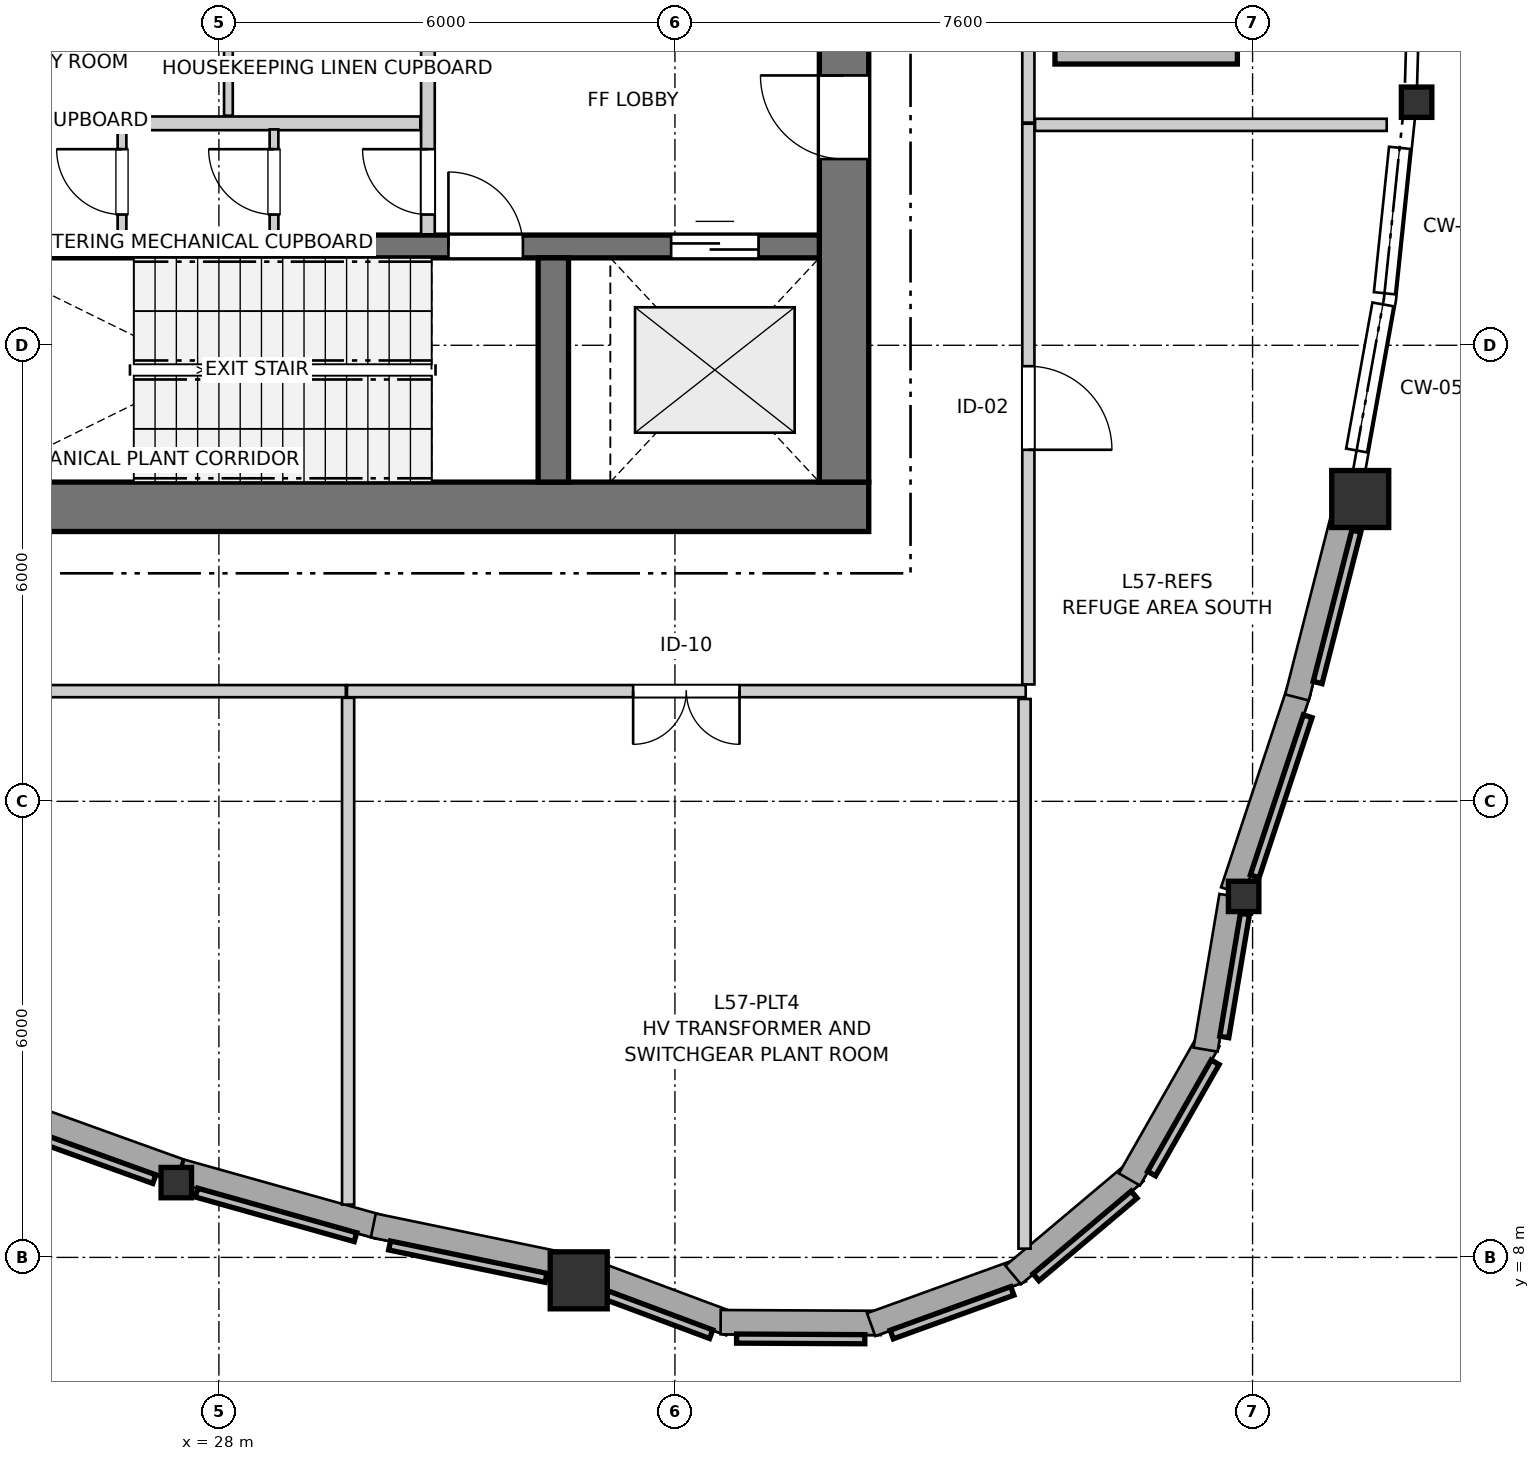
"""IFC4 building model, lengths in metres.
Left out: names, types, materials, properties, quantities, classifications, styles, units other than length and angle.
Written with IfcOpenShell. Run it as: python <this file> out.ifc"""

import sys

from ifc_helpers import new_model, si_unit, direction, frame, frame_2d, origin, origin_2d, place, context, subcontext, project, spatial, rectangle, i_section, extrude, source, transform, mapped, element, fill, save


model = new_model("IFC4")
c1 = context("Model", 3, precision=1e-05, world=origin(), true_north=direction((0.0, 1.0)))
c2 = subcontext(c1, "Body", "Model", "MODEL_VIEW")
j1 = project(units=[si_unit("LENGTHUNIT", "METRE"), si_unit("PLANEANGLEUNIT", "RADIAN")], contexts=[c1])
p1 = place(None, origin())
s1 = spatial("IfcSite", under=j1, at=p1, CompositionType="ELEMENT")
p2 = place(p1, origin())
s2 = spatial("IfcBuilding", under=s1, at=p2, CompositionType="ELEMENT")
p3 = place(p2, frame((0.0, 0.0, 190.6)))
s3 = spatial("IfcBuildingStorey", under=s2, at=p3, CompositionType="ELEMENT", Elevation=190.6)
p4 = place(p3, frame((24.15, 17.875, 0.0), z_axis=(0.0, 0.0, 1.0), x_axis=(1.0, 0.0, 0.0)))
e1 = element("IfcWall", 1, at=p4, inside=s3, PredefinedType="SHEAR", context=c2, shape_type="SweptSolid", body=[
    extrude(rectangle(XDim=12.4, YDim=0.65, at=frame_2d((6.2, 0.0))), origin(), (0.0, 0.0, 1.0), 4.76),
])
p5 = place(p3, frame((36.225, 18.2, 0.0), z_axis=(0.0, 0.0, 1.0), x_axis=(0.0, 1.0, 0.0)))
e2 = element("IfcWall", 2, at=p5, inside=s3, PredefinedType="SHEAR", context=c2, shape_type="SweptSolid", body=[
    extrude(rectangle(XDim=15.6, YDim=0.65, at=frame_2d((7.8, 0.0))), origin(), (0.0, 0.0, 1.0), 4.76),
])
p6 = place(p5, frame((4.25, 0.0, 0.0)))
e3 = element("IfcOpeningElement", 3, at=p6, cuts=e2, PredefinedType="OPENING", context=c2, shape_type="SweptSolid", body=[
    extrude(rectangle(XDim=1.1, YDim=2.15, at=frame_2d((0.55, 1.075))), frame((0.0, 0.335, 0.0), z_axis=(0.0, -1.0, 0.0), x_axis=(1.0, 0.0, 0.0)), (0.0, 0.0, 1.0), 0.67),
])
p7 = place(p5, frame((10.25, 0.0, 0.0)))
e4 = element("IfcOpeningElement", 4, at=p7, cuts=e2, PredefinedType="OPENING", context=c2, shape_type="SweptSolid", body=[
    extrude(rectangle(XDim=1.1, YDim=2.15, at=frame_2d((0.55, 1.075))), frame((0.0, 0.335, 0.0), z_axis=(0.0, -1.0, 0.0), x_axis=(1.0, 0.0, 0.0)), (0.0, 0.0, 1.0), 0.67),
])
p8 = place(p3, frame((24.8, 21.3, 0.0), z_axis=(0.0, 0.0, 1.0), x_axis=(1.0, 0.0, 0.0)))
e5 = element("IfcWall", 5, at=p8, inside=s3, PredefinedType="SHEAR", context=c2, shape_type="SweptSolid", body=[
    extrude(rectangle(XDim=11.1, YDim=0.3, at=frame_2d((5.55, 0.0))), origin(), (0.0, 0.0, 1.0), 4.76),
])
p9 = place(p8, frame((6.22, 0.0, 0.0)))
e6 = element("IfcOpeningElement", 6, at=p9, cuts=e5, PredefinedType="OPENING", context=c2, shape_type="SweptSolid", body=[
    extrude(rectangle(XDim=0.98, YDim=2.15, at=frame_2d((0.49, 1.075))), frame((0.0, 0.16, 0.0), z_axis=(0.0, -1.0, 0.0), x_axis=(1.0, 0.0, 0.0)), (0.0, 0.0, 1.0), 0.32),
])
p10 = place(p8, frame((9.15, 0.0, 0.0)))
e7 = element("IfcOpeningElement", 7, at=p10, cuts=e5, PredefinedType="OPENING", context=c2, shape_type="SweptSolid", body=[
    extrude(rectangle(XDim=1.15, YDim=2.15, at=frame_2d((0.575, 1.075))), frame((0.0, 0.16, 0.0), z_axis=(0.0, -1.0, 0.0), x_axis=(1.0, 0.0, 0.0)), (0.0, 0.0, 1.0), 0.32),
])
p11 = place(p3, frame((32.4, 18.2, 0.0), z_axis=(0.0, 0.0, 1.0), x_axis=(0.0, 1.0, 0.0)))
e8 = element("IfcWall", 8, at=p11, inside=s3, PredefinedType="SHEAR", context=c2, shape_type="SweptSolid", body=[
    extrude(rectangle(XDim=2.95, YDim=0.4, at=frame_2d((1.475, 0.0))), origin(), (0.0, 0.0, 1.0), 4.76),
])
m1 = source(origin(), c2, "Body", "SweptSolid", [
    extrude(i_section(OverallWidth=0.401, OverallDepth=0.399, WebThickness=0.023, FlangeThickness=0.036, FilletRadius=0.015, at=origin_2d()), origin(), (0.0, 0.0, 1.0), 4.76),
])
p12 = place(p3, frame((27.439, 8.984, 0.0), z_axis=(0.0, 0.0, 1.0), x_axis=(1.0, 0.0, 0.0)))
e9 = element("IfcColumn", 9, at=p12, inside=s3, PredefinedType="PILASTER", context=c2, shape_type="MappedRepresentation", body=[
    mapped(m1, transform((0.0, 0.0, 0.0), x_axis=(1.0, 0.0, 0.0), y_axis=(0.0, 1.0, 0.0), z_axis=(0.0, 0.0, 1.0), scale=1.0)),
])
m2 = source(origin(), c2, "Body", "SweptSolid", [
    extrude(rectangle(XDim=0.75, YDim=0.75, at=origin_2d()), origin(), (0.0, 0.0, 1.0), 4.76),
])
p13 = place(p3, frame((32.734, 7.698, 0.0), z_axis=(0.0, 0.0, 1.0), x_axis=(1.0, 0.0, 0.0)))
e10 = element("IfcColumn", 10, at=p13, inside=s3, PredefinedType="COLUMN", context=c2, shape_type="MappedRepresentation", body=[
    mapped(m2, transform((0.0, 0.0, 0.0), x_axis=(1.0, 0.0, 0.0), y_axis=(0.0, 1.0, 0.0), z_axis=(0.0, 0.0, 1.0), scale=1.0)),
])
p14 = place(p3, frame((41.483, 12.749, 0.0), z_axis=(0.0, 0.0, 1.0), x_axis=(1.0, 0.0, 0.0)))
e11 = element("IfcColumn", 11, at=p14, inside=s3, PredefinedType="PILASTER", context=c2, shape_type="MappedRepresentation", body=[
    mapped(m1, transform((0.0, 0.0, 0.0), x_axis=(1.0, 0.0, 0.0), y_axis=(0.0, 1.0, 0.0), z_axis=(0.0, 0.0, 1.0), scale=1.0)),
])
p15 = place(p3, frame((43.017, 17.977, 0.0), z_axis=(0.0, 0.0, 1.0), x_axis=(1.0, 0.0, 0.0)))
e12 = element("IfcColumn", 12, at=p15, inside=s3, PredefinedType="COLUMN", context=c2, shape_type="MappedRepresentation", body=[
    mapped(m2, transform((0.0, 0.0, 0.0), x_axis=(1.0, 0.0, 0.0), y_axis=(0.0, 1.0, 0.0), z_axis=(0.0, 0.0, 1.0), scale=1.0)),
])
p16 = place(p3, frame((43.758, 23.198, 0.0), z_axis=(0.0, 0.0, 1.0), x_axis=(1.0, 0.0, 0.0)))
e13 = element("IfcColumn", 13, at=p16, inside=s3, PredefinedType="PILASTER", context=c2, shape_type="MappedRepresentation", body=[
    mapped(m1, transform((0.0, 0.0, 0.0), x_axis=(1.0, 0.0, 0.0), y_axis=(0.0, 1.0, 0.0), z_axis=(0.0, 0.0, 1.0), scale=1.0)),
])
p17 = place(p3, frame((24.962, 10.046, 0.0), z_axis=(0.0, 0.0, 1.0), x_axis=(0.940882751101, -0.33873241457, 0.0)))
e14 = element("IfcWall", 14, at=p17, inside=s3, PredefinedType="SOLIDWALL", context=c2, shape_type="SweptSolid", body=[
    extrude(rectangle(XDim=2.671, YDim=0.32, at=frame_2d((1.335, 0.0))), origin(), (0.0, 0.0, 1.0), 4.34),
])
p18 = place(p3, frame((27.502, 9.133, 0.0), z_axis=(0.0, 0.0, 1.0), x_axis=(0.962852806557, -0.270026800345, 0.0)))
e15 = element("IfcWall", 15, at=p18, inside=s3, PredefinedType="SOLIDWALL", context=c2, shape_type="SweptSolid", body=[
    extrude(rectangle(XDim=2.715, YDim=0.32, at=frame_2d((1.357, 0.0))), origin(), (0.0, 0.0, 1.0), 4.34),
])
p19 = place(p3, frame((30.032, 8.42, 0.0), z_axis=(0.0, 0.0, 1.0), x_axis=(0.979291555144, -0.202455056799, 0.0)))
e16 = element("IfcWall", 16, at=p19, inside=s3, PredefinedType="SOLIDWALL", context=c2, shape_type="SweptSolid", body=[
    extrude(rectangle(XDim=2.628, YDim=0.32, at=frame_2d((1.314, 0.0))), origin(), (0.0, 0.0, 1.0), 4.34),
])
p20 = place(p3, frame((32.945, 7.791, 0.0), z_axis=(0.0, 0.0, 1.0), x_axis=(0.93690697627, -0.349578771977, 0.0)))
e17 = element("IfcWall", 17, at=p20, inside=s3, PredefinedType="SOLIDWALL", context=c2, shape_type="SweptSolid", body=[
    extrude(rectangle(XDim=1.906, YDim=0.32, at=frame_2d((0.953, 0.0))), origin(), (0.0, 0.0, 1.0), 4.34),
])
for number, where, z_axis, x_axis in (
    (18, (34.602, 7.148, 0.0), (0.0, 0.0, 1.0), (1.0, -0.005, 0.0)),
    (19, (36.581, 7.115, 0.0), (0.0, 0.0, 1.0), (0.94, 0.341, 0.0)),
):
    element("IfcWall", number, at=place(p3, frame(where, z_axis=z_axis, x_axis=x_axis)), inside=s3, PredefinedType="SOLIDWALL", context=c2, shape_type="SweptSolid", body=[
        extrude(rectangle(XDim=2.109, YDim=0.32, at=frame_2d((1.054, 0.0))), origin(), (0.0, 0.0, 1.0), 4.34),
    ])
p21 = place(p3, frame((38.451, 7.768, 0.0), z_axis=(0.0, 0.0, 1.0), x_axis=(0.764947219724, 0.644092967697, 0.0)))
e20 = element("IfcWall", 20, at=p21, inside=s3, PredefinedType="SOLIDWALL", context=c2, shape_type="SweptSolid", body=[
    extrude(rectangle(XDim=2.109, YDim=0.32, at=frame_2d((1.055, 0.0))), origin(), (0.0, 0.0, 1.0), 4.34),
])
p22 = place(p3, frame((39.98, 9.025, 0.0), z_axis=(0.0, 0.0, 1.0), x_axis=(0.495714993308, 0.868485259178, 0.0)))
e21 = element("IfcWall", 21, at=p22, inside=s3, PredefinedType="SOLIDWALL", context=c2, shape_type="SweptSolid", body=[
    extrude(rectangle(XDim=2.109, YDim=0.32, at=frame_2d((1.054, 0.0))), origin(), (0.0, 0.0, 1.0), 4.34),
])
p23 = place(p3, frame((40.982, 10.734, 0.0), z_axis=(0.0, 0.0, 1.0), x_axis=(0.165711561454, 0.986174263708, 0.0)))
e22 = element("IfcWall", 22, at=p23, inside=s3, PredefinedType="SOLIDWALL", context=c2, shape_type="SweptSolid", body=[
    extrude(rectangle(XDim=2.051, YDim=0.32, at=frame_2d((1.025, 0.0))), origin(), (0.0, 0.0, 1.0), 4.34),
])
p24 = place(p3, frame((41.337, 12.819, 0.0), z_axis=(0.0, 0.0, 1.0), x_axis=(0.31443095402, 0.949280345922, 0.0)))
e23 = element("IfcWall", 23, at=p24, inside=s3, PredefinedType="SOLIDWALL", context=c2, shape_type="SweptSolid", body=[
    extrude(rectangle(XDim=2.773, YDim=0.32, at=frame_2d((1.386, 0.0))), origin(), (0.0, 0.0, 1.0), 4.34),
])
p25 = place(p3, frame((42.184, 15.367, 0.0), z_axis=(0.0, 0.0, 1.0), x_axis=(0.247650778908, 0.968849364817, 0.0)))
e24 = element("IfcWall", 24, at=p25, inside=s3, PredefinedType="SOLIDWALL", context=c2, shape_type="SweptSolid", body=[
    extrude(rectangle(XDim=2.57, YDim=0.32, at=frame_2d((1.285, 0.0))), origin(), (0.0, 0.0, 1.0), 4.34),
])
p26 = place(p3, frame((30.75, 21.46, 0.0), z_axis=(0.0, 0.0, 1.0), x_axis=(0.0, 1.0, 0.0)))
e25 = element("IfcWall", 25, at=p26, inside=s3, PredefinedType="PARTITIONING", context=c2, shape_type="SweptSolid", body=[
    extrude(rectangle(XDim=3.11, YDim=0.18, at=frame_2d((1.555, 0.0))), origin(), (0.0, 0.0, 1.0), 4.76),
])
p27 = place(p26, frame((0.26, 0.0, 0.0)))
e26 = element("IfcOpeningElement", 26, at=p27, cuts=e25, PredefinedType="OPENING", context=c2, shape_type="SweptSolid", body=[
    extrude(rectangle(XDim=0.86, YDim=2.05, at=frame_2d((0.43, 1.025))), frame((0.0, 0.1, 0.0), z_axis=(0.0, -1.0, 0.0), x_axis=(1.0, 0.0, 0.0)), (0.0, 0.0, 1.0), 0.2),
])
p28 = place(p3, frame((24.81, 22.92, 0.0), z_axis=(0.0, 0.0, 1.0), x_axis=(1.0, 0.0, 0.0)))
e27 = element("IfcWall", 27, at=p28, inside=s3, PredefinedType="PARTITIONING", context=c2, shape_type="SweptSolid", body=[
    extrude(rectangle(XDim=5.84, YDim=0.18, at=frame_2d((2.92, 0.0))), origin(), (0.0, 0.0, 1.0), 4.76),
])
p29 = place(p3, frame((28.125, 23.02, 0.0), z_axis=(0.0, 0.0, 1.0), x_axis=(0.0, 1.0, 0.0)))
e28 = element("IfcWall", 28, at=p29, inside=s3, PredefinedType="PARTITIONING", context=c2, shape_type="SweptSolid", body=[
    extrude(rectangle(XDim=1.77, YDim=0.115, at=frame_2d((0.885, 0.0))), origin(), (0.0, 0.0, 1.0), 4.76),
])
p30 = place(p3, frame((26.725, 21.46, 0.0), z_axis=(0.0, 0.0, 1.0), x_axis=(0.0, 1.0, 0.0)))
e29 = element("IfcWall", 29, at=p30, inside=s3, PredefinedType="PARTITIONING", context=c2, shape_type="SweptSolid", body=[
    extrude(rectangle(XDim=1.38, YDim=0.115, at=frame_2d((0.69, 0.0))), origin(), (0.0, 0.0, 1.0), 4.76),
])
p31 = place(p30, frame((0.26, 0.0, 0.0)))
e30 = element("IfcOpeningElement", 30, at=p31, cuts=e29, PredefinedType="OPENING", context=c2, shape_type="SweptSolid", body=[
    extrude(rectangle(XDim=0.86, YDim=2.05, at=frame_2d((0.43, 1.025))), frame((0.0, 0.067, 0.0), z_axis=(0.0, -1.0, 0.0), x_axis=(1.0, 0.0, 0.0)), (0.0, 0.0, 1.0), 0.135),
])
p32 = place(p3, frame((28.725, 21.46, 0.0), z_axis=(0.0, 0.0, 1.0), x_axis=(0.0, 1.0, 0.0)))
e31 = element("IfcWall", 31, at=p32, inside=s3, PredefinedType="PARTITIONING", context=c2, shape_type="SweptSolid", body=[
    extrude(rectangle(XDim=1.38, YDim=0.115, at=frame_2d((0.69, 0.0))), origin(), (0.0, 0.0, 1.0), 4.76),
])
p33 = place(p32, frame((0.26, 0.0, 0.0)))
e32 = element("IfcOpeningElement", 32, at=p33, cuts=e31, PredefinedType="OPENING", context=c2, shape_type="SweptSolid", body=[
    extrude(rectangle(XDim=0.86, YDim=2.05, at=frame_2d((0.43, 1.025))), frame((0.0, 0.067, 0.0), z_axis=(0.0, -1.0, 0.0), x_axis=(1.0, 0.0, 0.0)), (0.0, 0.0, 1.0), 0.135),
])
p34 = place(p3, frame((38.615, 15.45, 0.0), z_axis=(0.0, 0.0, 1.0), x_axis=(-1.0, 0.0, 0.0)))
e33 = element("IfcWall", 33, at=p34, inside=s3, PredefinedType="PARTITIONING", context=c2, shape_type="SweptSolid", body=[
    extrude(rectangle(XDim=8.93, YDim=0.16, at=frame_2d((4.465, 0.0))), origin(), (0.0, 0.0, 1.0), 4.76),
])
p35 = place(p34, frame((3.765, 0.0, 0.0)))
e34 = element("IfcOpeningElement", 34, at=p35, cuts=e33, PredefinedType="OPENING", context=c2, shape_type="SweptSolid", body=[
    extrude(rectangle(XDim=1.4, YDim=2.15, at=frame_2d((0.7, 1.075))), frame((0.0, 0.09, 0.0), z_axis=(0.0, -1.0, 0.0), x_axis=(1.0, 0.0, 0.0)), (0.0, 0.0, 1.0), 0.18),
])
p36 = place(p3, frame((38.65, 22.915, 0.0), z_axis=(0.0, 0.0, 1.0), x_axis=(0.0, -1.0, 0.0)))
e35 = element("IfcWall", 35, at=p36, inside=s3, PredefinedType="PARTITIONING", context=c2, shape_type="SweptSolid", body=[
    extrude(rectangle(XDim=7.377, YDim=0.16, at=frame_2d((3.688, 0.0))), origin(), (0.0, 0.0, 1.0), 4.228),
])
p37 = place(p36, frame((3.19, 0.0, 0.0)))
e36 = element("IfcOpeningElement", 36, at=p37, cuts=e35, PredefinedType="OPENING", context=c2, shape_type="SweptSolid", body=[
    extrude(rectangle(XDim=1.1, YDim=2.15, at=frame_2d((0.55, 1.075))), frame((0.0, 0.09, 0.0), z_axis=(0.0, -1.0, 0.0), x_axis=(1.0, 0.0, 0.0)), (0.0, 0.0, 1.0), 0.18),
])
p38 = place(p3, frame((38.65, 29.07, 0.0), z_axis=(0.0, 0.0, 1.0), x_axis=(0.0, -1.0, 0.0)))
e37 = element("IfcWall", 37, at=p38, inside=s3, PredefinedType="PARTITIONING", context=c2, shape_type="SweptSolid", body=[
    extrude(rectangle(XDim=6.14, YDim=0.16, at=frame_2d((3.07, 0.0))), origin(), (0.0, 0.0, 1.0), 4.228),
])
p39 = place(p38, frame((2.37, 0.0, 0.0)))
e38 = element("IfcOpeningElement", 38, at=p39, cuts=e37, PredefinedType="OPENING", context=c2, shape_type="SweptSolid", body=[
    extrude(rectangle(XDim=1.4, YDim=2.15, at=frame_2d((0.7, 1.075))), frame((0.0, 0.09, 0.0), z_axis=(0.0, -1.0, 0.0), x_axis=(1.0, 0.0, 0.0)), (0.0, 0.0, 1.0), 0.18),
])
p40 = place(p3, frame((22.138, 15.45, 0.0), z_axis=(0.0, 0.0, 1.0), x_axis=(1.0, 0.0, 0.0)))
e39 = element("IfcWall", 39, at=p40, inside=s3, PredefinedType="PARTITIONING", context=c2, shape_type="SweptSolid", body=[
    extrude(rectangle(XDim=7.532, YDim=0.16, at=frame_2d((3.766, 0.0))), origin(), (0.0, 0.0, 1.0), 4.76),
])
p41 = place(p3, frame((38.6, 8.115, 0.0), z_axis=(0.0, 0.0, 1.0), x_axis=(0.0, 1.0, 0.0)))
e40 = element("IfcWall", 40, at=p41, inside=s3, PredefinedType="PARTITIONING", context=c2, shape_type="SweptSolid", body=[
    extrude(rectangle(XDim=7.232, YDim=0.16, at=frame_2d((3.616, 0.0))), origin(), (0.0, 0.0, 1.0), 4.76),
])
p42 = place(p3, frame((29.7, 8.695, 0.0), z_axis=(0.0, 0.0, 1.0), x_axis=(0.0, 1.0, 0.0)))
e41 = element("IfcWall", 41, at=p42, inside=s3, PredefinedType="PARTITIONING", context=c2, shape_type="SweptSolid", body=[
    extrude(rectangle(XDim=6.667, YDim=0.16, at=frame_2d((3.334, 0.0))), origin(), (0.0, 0.0, 1.0), 4.76),
])
p43 = place(p3, frame((38.738, 22.9, 0.0), z_axis=(0.0, 0.0, 1.0), x_axis=(1.0, 0.0, 0.0)))
e42 = element("IfcWall", 42, at=p43, inside=s3, PredefinedType="PARTITIONING", context=c2, shape_type="SweptSolid", body=[
    extrude(rectangle(XDim=4.627, YDim=0.16, at=frame_2d((2.313, 0.0))), origin(), (0.0, 0.0, 1.0), 2.928),
])
m3 = source(origin(), c2, "Body", "SweptSolid", [
    extrude(rectangle(XDim=0.98, YDim=2.15, at=frame_2d((0.49, 1.075))), frame((0.0, 0.025, 0.0), z_axis=(0.0, -1.0, 0.0), x_axis=(1.0, 0.0, 0.0)), (0.0, 0.0, 1.0), 0.05),
])
p44 = place(p9, origin())
e43 = element("IfcDoor", 43, at=p44, inside=s3, OperationType="SINGLE_SWING_LEFT", PredefinedType="DOOR", context=c2, shape_type="MappedRepresentation", body=[
    mapped(m3, transform((0.0, 0.0, 0.0), x_axis=(1.0, 0.0, 0.0), y_axis=(0.0, 1.0, 0.0), z_axis=(0.0, 0.0, 1.0), scale=1.0)),
])
fill(e6, e43)
m4 = source(origin(), c2, "Body", "SweptSolid", [
    extrude(rectangle(XDim=1.15, YDim=2.15, at=frame_2d((0.575, 1.075))), frame((0.0, 0.025, 0.0), z_axis=(0.0, -1.0, 0.0), x_axis=(1.0, 0.0, 0.0)), (0.0, 0.0, 1.0), 0.05),
])
p45 = place(p10, origin())
e44 = element("IfcDoor", 44, at=p45, inside=s3, OperationType="DOUBLE_DOOR_SLIDING", PredefinedType="DOOR", context=c2, shape_type="MappedRepresentation", body=[
    mapped(m4, transform((0.0, 0.0, 0.0), x_axis=(1.0, 0.0, 0.0), y_axis=(0.0, 1.0, 0.0), z_axis=(0.0, 0.0, 1.0), scale=1.0)),
])
fill(e7, e44)
m5 = source(origin(), c2, "Body", "SweptSolid", [
    extrude(rectangle(XDim=1.1, YDim=2.15, at=frame_2d((0.55, 1.075))), frame((0.0, 0.025, 0.0), z_axis=(0.0, -1.0, 0.0), x_axis=(1.0, 0.0, 0.0)), (0.0, 0.0, 1.0), 0.05),
])
p46 = place(p6, origin())
e45 = element("IfcDoor", 45, at=p46, inside=s3, OperationType="SINGLE_SWING_RIGHT", PredefinedType="DOOR", context=c2, shape_type="MappedRepresentation", body=[
    mapped(m5, transform((0.0, 0.0, 0.0), x_axis=(1.0, 0.0, 0.0), y_axis=(0.0, 1.0, 0.0), z_axis=(0.0, 0.0, 1.0), scale=1.0)),
])
fill(e3, e45)
m6 = source(origin(), c2, "Body", "SweptSolid", [
    extrude(rectangle(XDim=0.86, YDim=2.05, at=frame_2d((0.43, 1.025))), frame((0.0, 0.025, 0.0), z_axis=(0.0, -1.0, 0.0), x_axis=(1.0, 0.0, 0.0)), (0.0, 0.0, 1.0), 0.05),
])
p47 = place(p27, origin())
e46 = element("IfcDoor", 46, at=p47, inside=s3, OperationType="SINGLE_SWING_RIGHT", PredefinedType="DOOR", context=c2, shape_type="MappedRepresentation", body=[
    mapped(m6, transform((0.0, 0.0, 0.0), x_axis=(1.0, 0.0, 0.0), y_axis=(0.0, 1.0, 0.0), z_axis=(0.0, 0.0, 1.0), scale=1.0)),
])
fill(e26, e46)
p48 = place(p31, origin())
e47 = element("IfcDoor", 47, at=p48, inside=s3, OperationType="SINGLE_SWING_RIGHT", PredefinedType="DOOR", context=c2, shape_type="MappedRepresentation", body=[
    mapped(m6, transform((0.0, 0.0, 0.0), x_axis=(1.0, 0.0, 0.0), y_axis=(0.0, 1.0, 0.0), z_axis=(0.0, 0.0, 1.0), scale=1.0)),
])
fill(e30, e47)
p49 = place(p33, origin())
e48 = element("IfcDoor", 48, at=p49, inside=s3, OperationType="SINGLE_SWING_RIGHT", PredefinedType="DOOR", context=c2, shape_type="MappedRepresentation", body=[
    mapped(m6, transform((0.0, 0.0, 0.0), x_axis=(1.0, 0.0, 0.0), y_axis=(0.0, 1.0, 0.0), z_axis=(0.0, 0.0, 1.0), scale=1.0)),
])
fill(e32, e48)
m7 = source(origin(), c2, "Body", "SweptSolid", [
    extrude(rectangle(XDim=1.4, YDim=2.15, at=frame_2d((0.7, 1.075))), frame((0.0, 0.025, 0.0), z_axis=(0.0, -1.0, 0.0), x_axis=(1.0, 0.0, 0.0)), (0.0, 0.0, 1.0), 0.05),
])
p50 = place(p35, origin())
e49 = element("IfcDoor", 49, at=p50, inside=s3, OperationType="DOUBLE_DOOR_SINGLE_SWING", PredefinedType="DOOR", context=c2, shape_type="MappedRepresentation", body=[
    mapped(m7, transform((0.0, 0.0, 0.0), x_axis=(1.0, 0.0, 0.0), y_axis=(0.0, 1.0, 0.0), z_axis=(0.0, 0.0, 1.0), scale=1.0)),
])
fill(e34, e49)
p51 = place(p37, origin())
e50 = element("IfcDoor", 50, at=p51, inside=s3, OperationType="SINGLE_SWING_RIGHT", PredefinedType="DOOR", context=c2, shape_type="MappedRepresentation", body=[
    mapped(m5, transform((0.0, 0.0, 0.0), x_axis=(1.0, 0.0, 0.0), y_axis=(0.0, 1.0, 0.0), z_axis=(0.0, 0.0, 1.0), scale=1.0)),
])
fill(e36, e50)
save(model, sys.argv[1])
